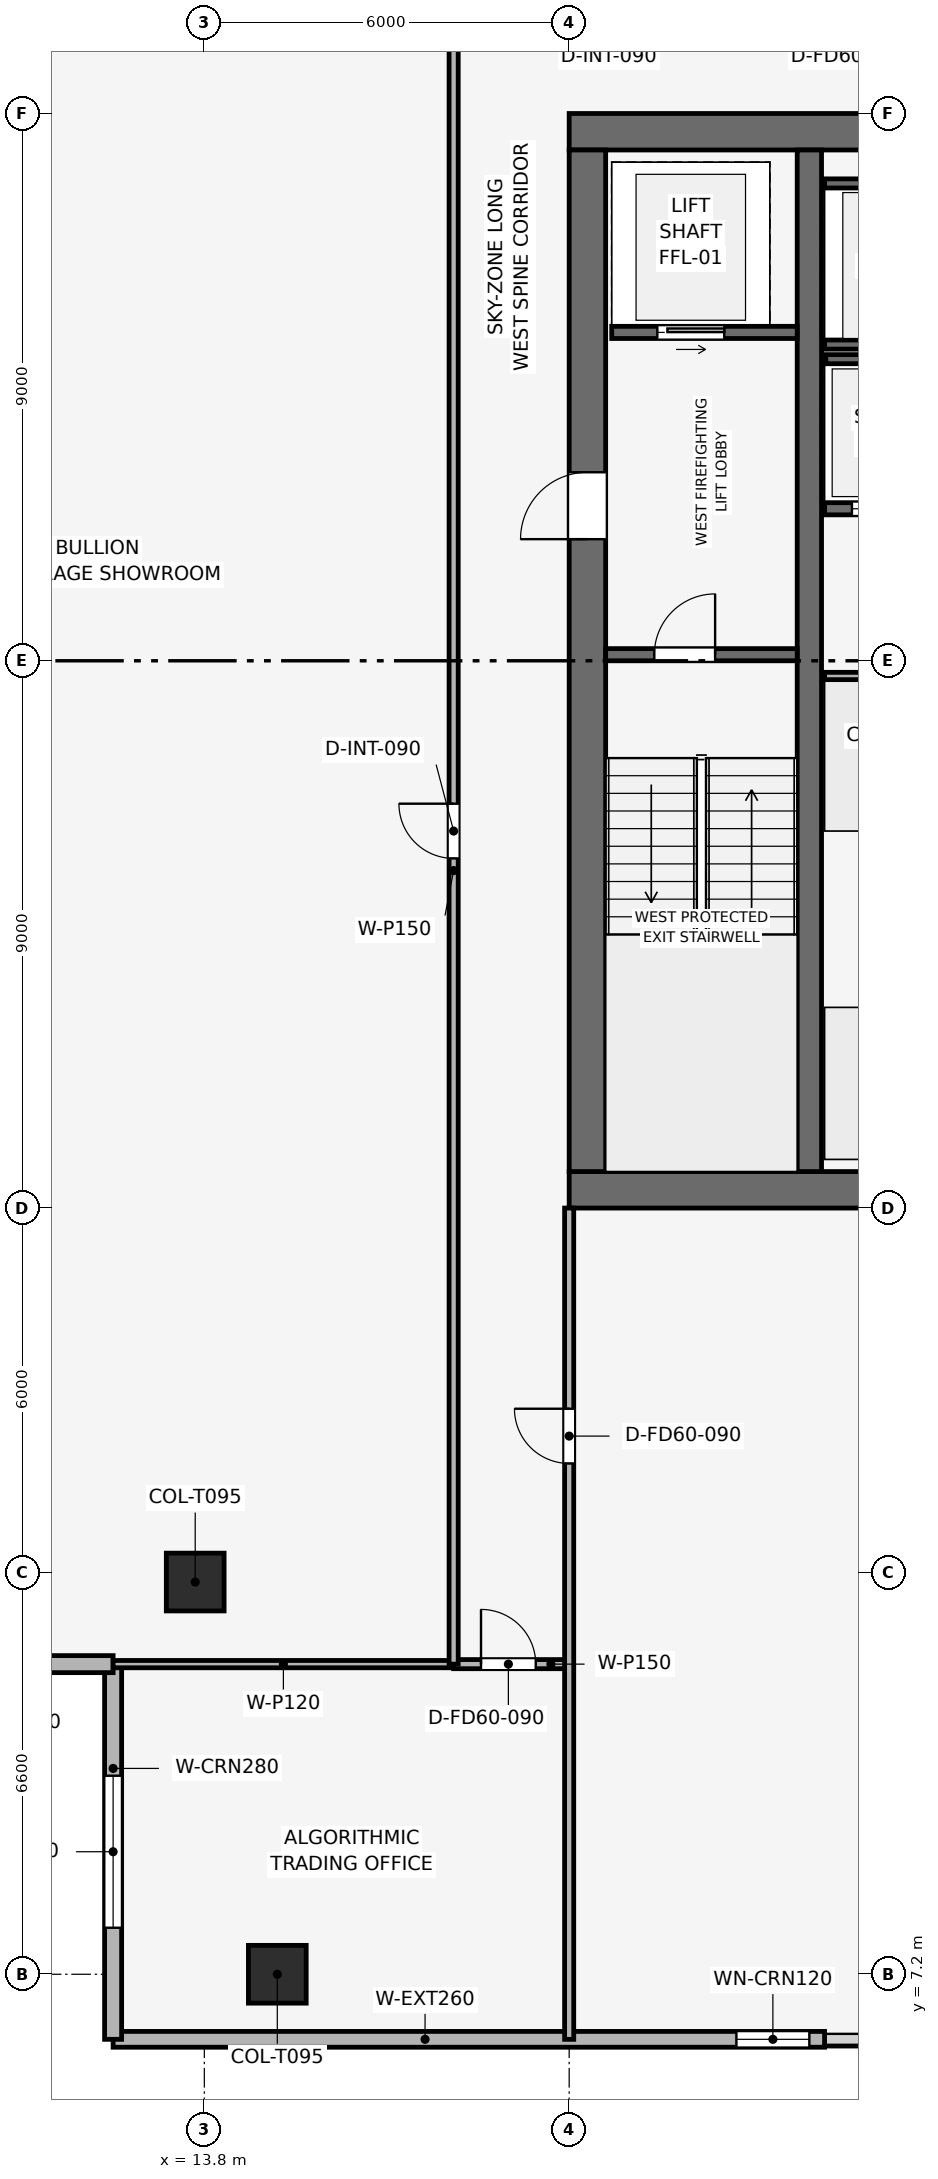
"""IFC4 building model, lengths in metres.
Left out: names, types, materials, properties, quantities, classifications, styles, units other than length and angle.
Written with IfcOpenShell. Run it as: python <this file> out.ifc"""

import sys

from ifc_helpers import new_model, si_unit, direction, frame, frame_2d, origin, origin_2d, place, context, subcontext, project, spatial, rectangle, extrude, element, fill, save


model = new_model("IFC4")
c1 = context("Model", 3, precision=1e-05, world=origin(), true_north=direction((0.0, 1.0)))
c2 = subcontext(c1, "Body", "Model", "MODEL_VIEW")
j1 = project(units=[si_unit("LENGTHUNIT", "METRE"), si_unit("PLANEANGLEUNIT", "RADIAN")], contexts=[c1])
p1 = place(None, origin())
s1 = spatial("IfcSite", under=j1, at=p1, CompositionType="ELEMENT")
p2 = place(p1, origin())
s2 = spatial("IfcBuilding", under=s1, at=p2, CompositionType="ELEMENT")
p3 = place(p2, frame((0.0, 0.0, 318.0)))
s3 = spatial("IfcBuildingStorey", under=s2, at=p3, CompositionType="ELEMENT", Elevation=318.0)
p4 = place(p3, frame((19.8, 20.1, 0.0), z_axis=(0.0, 0.0, 1.0), x_axis=(1.0, 0.0, 0.0)))
e1 = element("IfcWall", 1, at=p4, inside=s3, PredefinedType="SHEAR", context=c2, shape_type="SweptSolid", body=[
    extrude(rectangle(XDim=18.0, YDim=0.6, at=frame_2d((9.0, 0.0))), origin(), (0.0, 0.0, 1.0), 3.75),
])
p5 = place(p3, frame((19.8, 37.5, 0.0), z_axis=(0.0, 0.0, 1.0), x_axis=(1.0, 0.0, 0.0)))
e2 = element("IfcWall", 2, at=p5, inside=s3, PredefinedType="SHEAR", context=c2, shape_type="SweptSolid", body=[
    extrude(rectangle(XDim=18.0, YDim=0.6, at=frame_2d((9.0, 0.0))), origin(), (0.0, 0.0, 1.0), 3.75),
])
p6 = place(p5, frame((7.05, 0.0, 0.0)))
e3 = element("IfcOpeningElement", 3, at=p6, cuts=e2, PredefinedType="OPENING", context=c2, shape_type="SweptSolid", body=[
    extrude(rectangle(XDim=1.1, YDim=2.15, at=frame_2d((0.55, 1.075))), frame((0.0, 0.31, 0.0), z_axis=(0.0, -1.0, 0.0), x_axis=(1.0, 0.0, 0.0)), (0.0, 0.0, 1.0), 0.62),
])
p7 = place(p3, frame((20.1, 20.4, 0.0), z_axis=(0.0, 0.0, 1.0), x_axis=(0.0, 1.0, 0.0)))
e4 = element("IfcWall", 4, at=p7, inside=s3, PredefinedType="SHEAR", context=c2, shape_type="SweptSolid", body=[
    extrude(rectangle(XDim=16.8, YDim=0.6, at=frame_2d((8.4, 0.0))), origin(), (0.0, 0.0, 1.0), 3.75),
])
p8 = place(p7, frame((10.4, 0.0, 0.0)))
e5 = element("IfcOpeningElement", 5, at=p8, cuts=e4, PredefinedType="OPENING", context=c2, shape_type="SweptSolid", body=[
    extrude(rectangle(XDim=1.1, YDim=2.15, at=frame_2d((0.55, 1.075))), frame((0.0, 0.31, 0.0), z_axis=(0.0, -1.0, 0.0), x_axis=(1.0, 0.0, 0.0)), (0.0, 0.0, 1.0), 0.62),
])
p9 = place(p3, frame((23.75, 20.4, 0.0), z_axis=(0.0, 0.0, 1.0), x_axis=(0.0, 1.0, 0.0)))
e6 = element("IfcWall", 6, at=p9, inside=s3, PredefinedType="SHEAR", context=c2, shape_type="SweptSolid", body=[
    extrude(rectangle(XDim=16.8, YDim=0.4, at=frame_2d((8.4, 0.0))), origin(), (0.0, 0.0, 1.0), 3.75),
])
for number, where, z_axis, x_axis in (
    (7, (15.0, 7.2, 0.003), (0.0, 0.0, 1.0), (1.0, 0.0, 0.0)),
    (8, (13.65, 13.65, 0.003), (0.0, 0.0, 1.0), (1.0, 0.0, 0.0)),
):
    element("IfcColumn", number, at=place(p3, frame(where, z_axis=z_axis, x_axis=x_axis)), inside=s3, PredefinedType="COLUMN", context=c2, shape_type="SweptSolid", body=[
        extrude(rectangle(XDim=0.95, YDim=0.95, at=origin_2d()), origin(), (0.0, 0.0, 1.0), 3.504),
    ])
p10 = place(p3, frame((24.0, 6.13, 0.0), z_axis=(0.0, 0.0, 1.0), x_axis=(-1.0, 0.0, 0.0)))
e9 = element("IfcWall", 9, at=p10, inside=s3, PredefinedType="SOLIDWALL", context=c2, shape_type="SweptSolid", body=[
    extrude(rectangle(XDim=11.7, YDim=0.26, at=frame_2d((5.85, 0.0))), origin(), (0.0, 0.0, 1.0), 3.51),
])
p11 = place(p10, frame((0.25, 0.0, 0.9)))
e10 = element("IfcOpeningElement", 10, at=p11, cuts=e9, PredefinedType="OPENING", context=c2, shape_type="SweptSolid", body=[
    extrude(rectangle(XDim=1.2, YDim=2.1, at=frame_2d((0.6, 1.05))), frame((0.0, 0.14, 0.0), z_axis=(0.0, -1.0, 0.0), x_axis=(1.0, 0.0, 0.0)), (0.0, 0.0, 1.0), 0.28),
])
p12 = place(p3, frame((12.3, 6.13, 0.0), z_axis=(0.0, 0.0, 1.0), x_axis=(0.0, 1.0, 0.0)))
e11 = element("IfcWall", 11, at=p12, inside=s3, PredefinedType="SOLIDWALL", context=c2, shape_type="SweptSolid", body=[
    extrude(rectangle(XDim=6.17, YDim=0.28, at=frame_2d((3.085, 0.0))), origin(), (0.0, 0.0, 1.0), 3.51),
])
p13 = place(p12, frame((1.835, 0.0, 0.9)))
e12 = element("IfcOpeningElement", 12, at=p13, cuts=e11, PredefinedType="OPENING", context=c2, shape_type="SweptSolid", body=[
    extrude(rectangle(XDim=2.5, YDim=1.9, at=frame_2d((1.25, 0.95))), frame((0.0, 0.15, 0.0), z_axis=(0.0, -1.0, 0.0), x_axis=(1.0, 0.0, 0.0)), (0.0, 0.0, 1.0), 0.3),
])
p14 = place(p3, frame((12.3, 12.3, 0.0), z_axis=(0.0, 0.0, 1.0), x_axis=(-1.0, 0.0, 0.0)))
e13 = element("IfcWall", 13, at=p14, inside=s3, PredefinedType="SOLIDWALL", context=c2, shape_type="SweptSolid", body=[
    extrude(rectangle(XDim=6.17, YDim=0.28, at=frame_2d((3.085, 0.0))), origin(), (0.0, 0.0, 1.0), 3.51),
])
p15 = place(p14, frame((1.835, 0.0, 0.9)))
e14 = element("IfcOpeningElement", 14, at=p15, cuts=e13, PredefinedType="OPENING", context=c2, shape_type="SweptSolid", body=[
    extrude(rectangle(XDim=2.5, YDim=1.9, at=frame_2d((1.25, 0.95))), frame((0.0, 0.15, 0.0), z_axis=(0.0, -1.0, 0.0), x_axis=(1.0, 0.0, 0.0)), (0.0, 0.0, 1.0), 0.3),
])
p16 = place(p3, frame((20.4, 28.9, 0.0), z_axis=(0.0, 0.0, 1.0), x_axis=(1.0, 0.0, 0.0)))
e15 = element("IfcWall", 15, at=p16, inside=s3, PredefinedType="SHEAR", context=c2, shape_type="SweptSolid", body=[
    extrude(rectangle(XDim=3.15, YDim=0.2, at=frame_2d((1.575, 0.0))), origin(), (0.0, 0.0, 1.0), 3.51),
])
p17 = place(p16, frame((0.8, 0.0, 0.0)))
e16 = element("IfcOpeningElement", 16, at=p17, cuts=e15, PredefinedType="OPENING", context=c2, shape_type="SweptSolid", body=[
    extrude(rectangle(XDim=1.0, YDim=2.1, at=frame_2d((0.5, 1.05))), frame((0.0, 0.11, 0.0), z_axis=(0.0, -1.0, 0.0), x_axis=(1.0, 0.0, 0.0)), (0.0, 0.0, 1.0), 0.22),
])
p18 = place(p3, frame((20.5, 34.2, 0.0), z_axis=(0.0, 0.0, 1.0), x_axis=(1.0, 0.0, 0.0)))
e17 = element("IfcWall", 17, at=p18, inside=s3, PredefinedType="SHEAR", context=c2, shape_type="SweptSolid", body=[
    extrude(rectangle(XDim=3.05, YDim=0.2, at=frame_2d((1.525, 0.0))), origin(), (0.0, 0.0, 1.0), 3.51),
])
p19 = place(p18, frame((0.75, 0.0, 0.0)))
e18 = element("IfcOpeningElement", 18, at=p19, cuts=e17, PredefinedType="OPENING", context=c2, shape_type="SweptSolid", body=[
    extrude(rectangle(XDim=1.1, YDim=2.15, at=frame_2d((0.55, 1.075))), frame((0.0, 0.11, 0.0), z_axis=(0.0, -1.0, 0.0), x_axis=(1.0, 0.0, 0.0)), (0.0, 0.0, 1.0), 0.22),
])
for number, where, z_axis, x_axis in (
    (19, (24.0, 34.0, 0.0), (0.0, 0.0, 1.0), (1.0, 0.0, 0.0)),
    (20, (24.0, 36.65, 0.0), (0.0, 0.0, 1.0), (1.0, 0.0, 0.0)),
):
    element("IfcWall", number, at=place(p3, frame(where, z_axis=z_axis, x_axis=x_axis)), inside=s3, PredefinedType="SHEAR", context=c2, shape_type="SweptSolid", body=[
        extrude(rectangle(XDim=2.48, YDim=0.15, at=frame_2d((1.24, 0.0))), origin(), (0.0, 0.0, 1.0), 3.51),
    ])
p20 = place(p3, frame((24.0, 31.3, 0.0), z_axis=(0.0, 0.0, 1.0), x_axis=(1.0, 0.0, 0.0)))
e21 = element("IfcWall", 21, at=p20, inside=s3, PredefinedType="SHEAR", context=c2, shape_type="SweptSolid", body=[
    extrude(rectangle(XDim=2.0, YDim=0.2, at=frame_2d((1.0, 0.0))), origin(), (0.0, 0.0, 1.0), 3.51),
])
p21 = place(p20, frame((0.45, 0.0, 0.0)))
e22 = element("IfcOpeningElement", 22, at=p21, cuts=e21, PredefinedType="OPENING", context=c2, shape_type="SweptSolid", body=[
    extrude(rectangle(XDim=1.1, YDim=2.15, at=frame_2d((0.55, 1.075))), frame((0.0, 0.11, 0.0), z_axis=(0.0, -1.0, 0.0), x_axis=(1.0, 0.0, 0.0)), (0.0, 0.0, 1.0), 0.22),
])
p22 = place(p3, frame((24.02, 33.76, 0.0), z_axis=(0.0, 0.0, 1.0), x_axis=(1.0, 0.0, 0.0)))
e23 = element("IfcWall", 23, at=p22, inside=s3, PredefinedType="SHEAR", context=c2, shape_type="SweptSolid", body=[
    extrude(rectangle(XDim=4.08, YDim=0.15, at=frame_2d((2.04, 0.0))), origin(), (0.0, 0.0, 1.0), 3.51),
])
p23 = place(p3, frame((24.0, 28.55, 0.0), z_axis=(0.0, 0.0, 1.0), x_axis=(1.0, 0.0, 0.0)))
e24 = element("IfcWall", 24, at=p23, inside=s3, PredefinedType="PARTITIONING", context=c2, shape_type="SweptSolid", body=[
    extrude(rectangle(XDim=4.05, YDim=0.12, at=frame_2d((2.025, 0.0))), origin(), (0.0, 0.0, 1.0), 3.51),
])
p24 = place(p23, frame((1.575, 0.0, 0.0)))
e25 = element("IfcOpeningElement", 25, at=p24, cuts=e24, PredefinedType="OPENING", context=c2, shape_type="SweptSolid", body=[
    extrude(rectangle(XDim=0.9, YDim=2.1, at=frame_2d((0.45, 1.05))), frame((0.0, 0.07, 0.0), z_axis=(0.0, -1.0, 0.0), x_axis=(1.0, 0.0, 0.0)), (0.0, 0.0, 1.0), 0.14),
])
p25 = place(p3, frame((12.3, 12.3, 0.0), z_axis=(0.0, 0.0, 1.0), x_axis=(1.0, 0.0, 0.0)))
e26 = element("IfcWall", 26, at=p25, inside=s3, PredefinedType="PARTITIONING", context=c2, shape_type="SweptSolid", body=[
    extrude(rectangle(XDim=5.6, YDim=0.12, at=frame_2d((2.8, 0.0))), origin(), (0.0, 0.0, 1.0), 3.195),
])
p26 = place(p3, frame((17.9, 12.3, 0.0), z_axis=(0.0, 0.0, 1.0), x_axis=(1.0, 0.0, 0.0)))
e27 = element("IfcWall", 27, at=p26, inside=s3, PredefinedType="PARTITIONING", context=c2, shape_type="SweptSolid", body=[
    extrude(rectangle(XDim=1.9, YDim=0.15, at=frame_2d((0.95, 0.0))), origin(), (0.0, 0.0, 1.0), 3.51),
])
p27 = place(p26, frame((0.45, 0.0, 0.0)))
e28 = element("IfcOpeningElement", 28, at=p27, cuts=e27, PredefinedType="OPENING", context=c2, shape_type="SweptSolid", body=[
    extrude(rectangle(XDim=0.9, YDim=2.1, at=frame_2d((0.45, 1.05))), frame((0.0, 0.085, 0.0), z_axis=(0.0, -1.0, 0.0), x_axis=(1.0, 0.0, 0.0)), (0.0, 0.0, 1.0), 0.17),
])
p28 = place(p3, frame((19.8, 6.13, 0.0), z_axis=(0.0, 0.0, 1.0), x_axis=(0.0, 1.0, 0.0)))
e29 = element("IfcWall", 29, at=p28, inside=s3, PredefinedType="PARTITIONING", context=c2, shape_type="SweptSolid", body=[
    extrude(rectangle(XDim=13.67, YDim=0.15, at=frame_2d((6.835, 0.0))), origin(), (0.0, 0.0, 1.0), 3.095),
])
p29 = place(p28, frame((9.47, 0.0, 0.0)))
e30 = element("IfcOpeningElement", 30, at=p29, cuts=e29, PredefinedType="OPENING", context=c2, shape_type="SweptSolid", body=[
    extrude(rectangle(XDim=0.9, YDim=2.1, at=frame_2d((0.45, 1.05))), frame((0.0, 0.085, 0.0), z_axis=(0.0, -1.0, 0.0), x_axis=(1.0, 0.0, 0.0)), (0.0, 0.0, 1.0), 0.17),
])
p30 = place(p3, frame((17.9, 12.3, 0.0), z_axis=(0.0, 0.0, 1.0), x_axis=(0.0, 1.0, 0.0)))
e31 = element("IfcWall", 31, at=p30, inside=s3, PredefinedType="PARTITIONING", context=c2, shape_type="SweptSolid", body=[
    extrude(rectangle(XDim=27.4, YDim=0.15, at=frame_2d((13.7, 0.0))), origin(), (0.0, 0.0, 1.0), 3.095),
])
p31 = place(p30, frame((13.25, 0.0, 0.0)))
e32 = element("IfcOpeningElement", 32, at=p31, cuts=e31, PredefinedType="OPENING", context=c2, shape_type="SweptSolid", body=[
    extrude(rectangle(XDim=0.9, YDim=2.1, at=frame_2d((0.45, 1.05))), frame((0.0, 0.085, 0.0), z_axis=(0.0, -1.0, 0.0), x_axis=(1.0, 0.0, 0.0)), (0.0, 0.0, 1.0), 0.17),
])
p32 = place(p11, origin())
e33 = element("IfcWindow", 33, at=p32, inside=s3, PartitioningType="SINGLE_PANEL", PredefinedType="WINDOW", context=c2, shape_type="SweptSolid", body=[
    extrude(rectangle(XDim=1.2, YDim=2.1, at=frame_2d((0.6, 1.05))), frame((0.0, 0.03, 0.0), z_axis=(0.0, -1.0, 0.0), x_axis=(1.0, 0.0, 0.0)), (0.0, 0.0, 1.0), 0.06),
])
fill(e10, e33)
p33 = place(p13, origin())
e34 = element("IfcWindow", 34, at=p33, inside=s3, PartitioningType="SINGLE_PANEL", PredefinedType="WINDOW", context=c2, shape_type="SweptSolid", body=[
    extrude(rectangle(XDim=2.5, YDim=1.9, at=frame_2d((1.25, 0.95))), frame((0.0, 0.03, 0.0), z_axis=(0.0, -1.0, 0.0), x_axis=(1.0, 0.0, 0.0)), (0.0, 0.0, 1.0), 0.06),
])
fill(e12, e34)
p34 = place(p17, origin())
e35 = element("IfcDoor", 35, at=p34, inside=s3, OperationType="SINGLE_SWING_RIGHT", PredefinedType="DOOR", context=c2, shape_type="SweptSolid", body=[
    extrude(rectangle(XDim=1.0, YDim=2.1, at=frame_2d((0.5, 1.05))), frame((0.0, 0.025, 0.0), z_axis=(0.0, -1.0, 0.0), x_axis=(1.0, 0.0, 0.0)), (0.0, 0.0, 1.0), 0.05),
])
fill(e16, e35)
p35 = place(p19, origin())
e36 = element("IfcDoor", 36, at=p35, inside=s3, OperationType="SLIDING_TO_RIGHT", PredefinedType="DOOR", context=c2, shape_type="SweptSolid", body=[
    extrude(rectangle(XDim=1.1, YDim=2.15, at=frame_2d((0.55, 1.075))), frame((0.0, 0.025, 0.0), z_axis=(0.0, -1.0, 0.0), x_axis=(1.0, 0.0, 0.0)), (0.0, 0.0, 1.0), 0.05),
])
fill(e18, e36)
p36 = place(p21, origin())
e37 = element("IfcDoor", 37, at=p36, inside=s3, OperationType="SLIDING_TO_RIGHT", PredefinedType="DOOR", context=c2, shape_type="SweptSolid", body=[
    extrude(rectangle(XDim=1.1, YDim=2.15, at=frame_2d((0.55, 1.075))), frame((0.0, 0.025, 0.0), z_axis=(0.0, -1.0, 0.0), x_axis=(1.0, 0.0, 0.0)), (0.0, 0.0, 1.0), 0.05),
])
fill(e22, e37)
p37 = place(p27, origin())
e38 = element("IfcDoor", 38, at=p37, inside=s3, OperationType="SINGLE_SWING_LEFT", PredefinedType="DOOR", context=c2, shape_type="SweptSolid", body=[
    extrude(rectangle(XDim=0.9, YDim=2.1, at=frame_2d((0.45, 1.05))), frame((0.0, 0.025, 0.0), z_axis=(0.0, -1.0, 0.0), x_axis=(1.0, 0.0, 0.0)), (0.0, 0.0, 1.0), 0.05),
])
fill(e28, e38)
p38 = place(p29, origin())
e39 = element("IfcDoor", 39, at=p38, inside=s3, OperationType="SINGLE_SWING_RIGHT", PredefinedType="DOOR", context=c2, shape_type="SweptSolid", body=[
    extrude(rectangle(XDim=0.9, YDim=2.1, at=frame_2d((0.45, 1.05))), frame((0.0, 0.025, 0.0), z_axis=(0.0, -1.0, 0.0), x_axis=(1.0, 0.0, 0.0)), (0.0, 0.0, 1.0), 0.05),
])
fill(e30, e39)
p39 = place(p31, origin())
e40 = element("IfcDoor", 40, at=p39, inside=s3, OperationType="SINGLE_SWING_RIGHT", PredefinedType="DOOR", context=c2, shape_type="SweptSolid", body=[
    extrude(rectangle(XDim=0.9, YDim=2.1, at=frame_2d((0.45, 1.05))), frame((0.0, 0.025, 0.0), z_axis=(0.0, -1.0, 0.0), x_axis=(1.0, 0.0, 0.0)), (0.0, 0.0, 1.0), 0.05),
])
fill(e32, e40)
p40 = place(p8, origin())
e41 = element("IfcDoor", 41, at=p40, inside=s3, OperationType="SINGLE_SWING_LEFT", PredefinedType="DOOR", context=c2, shape_type="SweptSolid", body=[
    extrude(rectangle(XDim=1.1, YDim=2.15, at=frame_2d((0.55, 1.075))), frame((0.0, 0.025, 0.0), z_axis=(0.0, -1.0, 0.0), x_axis=(1.0, 0.0, 0.0)), (0.0, 0.0, 1.0), 0.05),
])
fill(e5, e41)
save(model, sys.argv[1])
